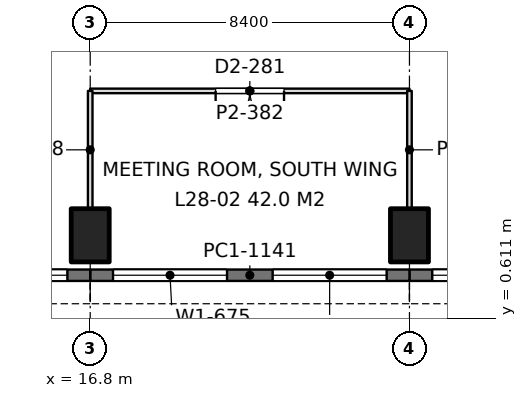
"""IFC4 building model, lengths in metres.
Left out: names, types, materials, properties, quantities, classifications, styles, units other than length and angle.
Written with IfcOpenShell. Run it as: python <this file> out.ifc"""

import sys

from ifc_helpers import new_model, si_unit, direction, frame, frame_2d, origin, origin_2d, place, context, subcontext, project, spatial, rectangle, extrude, element, fill, save


model = new_model("IFC4")
c1 = context("Model", 3, precision=1e-05, world=origin(), true_north=direction((0.0, 1.0)))
c2 = subcontext(c1, "Body", "Model", "MODEL_VIEW")
j1 = project(units=[si_unit("LENGTHUNIT", "METRE"), si_unit("PLANEANGLEUNIT", "RADIAN")], contexts=[c1])
p1 = place(None, origin())
s1 = spatial("IfcSite", under=j1, at=p1, CompositionType="ELEMENT")
p2 = place(p1, origin())
s2 = spatial("IfcBuilding", under=s1, at=p2, CompositionType="ELEMENT")
p3 = place(p2, frame((0.0, 0.0, 126.0)))
s3 = spatial("IfcBuildingStorey", under=s2, at=p3, CompositionType="ELEMENT", Elevation=126.0)
for number, where, z_axis, x_axis in (
    (1, (16.8, 2.8, 0.0), (0.0, 0.0, 1.0), (1.0, 0.0, 0.0)),
    (2, (25.2, 2.8, 0.0), (0.0, 0.0, 1.0), (1.0, 0.0, 0.0)),
):
    element("IfcColumn", number, at=place(p3, frame(where, z_axis=z_axis, x_axis=x_axis)), inside=s3, PredefinedType="COLUMN", context=c2, shape_type="SweptSolid", body=[
        extrude(rectangle(XDim=1.0, YDim=1.4, at=origin_2d()), origin(), (0.0, 0.0, 1.0), 4.2),
    ])
p4 = place(p3, frame((33.6, 1.75, 0.0), z_axis=(0.0, 0.0, 1.0), x_axis=(-1.0, 0.0, 0.0)))
e3 = element("IfcWall", 3, at=p4, inside=s3, PredefinedType="SOLIDWALL", context=c2, shape_type="SweptSolid", body=[
    extrude(rectangle(XDim=8.4, YDim=0.3, at=frame_2d((4.2, 0.0))), origin(), (0.0, 0.0, 1.0), 4.05),
])
p5 = place(p4, frame((0.6, 0.0, 0.9)))
e4 = element("IfcOpeningElement", 4, at=p5, cuts=e3, PredefinedType="OPENING", context=c2, shape_type="SweptSolid", body=[
    extrude(rectangle(XDim=3.0, YDim=1.9, at=frame_2d((1.5, 0.95))), frame((0.0, 0.16, 0.0), z_axis=(0.0, -1.0, 0.0), x_axis=(1.0, 0.0, 0.0)), (0.0, 0.0, 1.0), 0.32),
])
p6 = place(p4, frame((4.8, 0.0, 0.9)))
e5 = element("IfcOpeningElement", 5, at=p6, cuts=e3, PredefinedType="OPENING", context=c2, shape_type="SweptSolid", body=[
    extrude(rectangle(XDim=3.0, YDim=1.9, at=frame_2d((1.5, 0.95))), frame((0.0, 0.16, 0.0), z_axis=(0.0, -1.0, 0.0), x_axis=(1.0, 0.0, 0.0)), (0.0, 0.0, 1.0), 0.32),
])
p7 = place(p3, frame((25.2, 1.75, 0.0), z_axis=(0.0, 0.0, 1.0), x_axis=(-1.0, 0.0, 0.0)))
e6 = element("IfcWall", 6, at=p7, inside=s3, PredefinedType="SOLIDWALL", context=c2, shape_type="SweptSolid", body=[
    extrude(rectangle(XDim=8.4, YDim=0.3, at=frame_2d((4.2, 0.0))), origin(), (0.0, 0.0, 1.0), 4.05),
])
p8 = place(p7, frame((0.6, 0.0, 0.9)))
e7 = element("IfcOpeningElement", 7, at=p8, cuts=e6, PredefinedType="OPENING", context=c2, shape_type="SweptSolid", body=[
    extrude(rectangle(XDim=3.0, YDim=1.9, at=frame_2d((1.5, 0.95))), frame((0.0, 0.16, 0.0), z_axis=(0.0, -1.0, 0.0), x_axis=(1.0, 0.0, 0.0)), (0.0, 0.0, 1.0), 0.32),
])
p9 = place(p7, frame((4.8, 0.0, 0.9)))
e8 = element("IfcOpeningElement", 8, at=p9, cuts=e6, PredefinedType="OPENING", context=c2, shape_type="SweptSolid", body=[
    extrude(rectangle(XDim=3.0, YDim=1.9, at=frame_2d((1.5, 0.95))), frame((0.0, 0.16, 0.0), z_axis=(0.0, -1.0, 0.0), x_axis=(1.0, 0.0, 0.0)), (0.0, 0.0, 1.0), 0.32),
])
p10 = place(p3, frame((16.8, 1.75, 0.0), z_axis=(0.0, 0.0, 1.0), x_axis=(-1.0, 0.0, 0.0)))
e9 = element("IfcWall", 9, at=p10, inside=s3, PredefinedType="SOLIDWALL", context=c2, shape_type="SweptSolid", body=[
    extrude(rectangle(XDim=8.4, YDim=0.3, at=frame_2d((4.2, 0.0))), origin(), (0.0, 0.0, 1.0), 4.05),
])
p11 = place(p10, frame((0.6, 0.0, 0.9)))
e10 = element("IfcOpeningElement", 10, at=p11, cuts=e9, PredefinedType="OPENING", context=c2, shape_type="SweptSolid", body=[
    extrude(rectangle(XDim=3.0, YDim=1.9, at=frame_2d((1.5, 0.95))), frame((0.0, 0.16, 0.0), z_axis=(0.0, -1.0, 0.0), x_axis=(1.0, 0.0, 0.0)), (0.0, 0.0, 1.0), 0.32),
])
p12 = place(p10, frame((4.8, 0.0, 0.9)))
e11 = element("IfcOpeningElement", 11, at=p12, cuts=e9, PredefinedType="OPENING", context=c2, shape_type="SweptSolid", body=[
    extrude(rectangle(XDim=3.0, YDim=1.9, at=frame_2d((1.5, 0.95))), frame((0.0, 0.16, 0.0), z_axis=(0.0, -1.0, 0.0), x_axis=(1.0, 0.0, 0.0)), (0.0, 0.0, 1.0), 0.32),
])
p13 = place(p3, frame((16.8, 6.6, 0.0), z_axis=(0.0, 0.0, 1.0), x_axis=(1.0, 0.0, 0.0)))
e12 = element("IfcWall", 12, at=p13, inside=s3, PredefinedType="PARTITIONING", context=c2, shape_type="SweptSolid", body=[
    extrude(rectangle(XDim=8.4, YDim=0.12, at=frame_2d((4.2, 0.0))), origin(), (0.0, 0.0, 1.0), 3.55),
])
p14 = place(p13, frame((3.3, 0.0, 0.0)))
e13 = element("IfcOpeningElement", 13, at=p14, cuts=e12, PredefinedType="OPENING", context=c2, shape_type="SweptSolid", body=[
    extrude(rectangle(XDim=1.8, YDim=2.2, at=frame_2d((0.9, 1.1))), frame((0.0, 0.07, 0.0), z_axis=(0.0, -1.0, 0.0), x_axis=(1.0, 0.0, 0.0)), (0.0, 0.0, 1.0), 0.14),
])
for number, where, z_axis, x_axis in (
    (14, (16.8, 3.499, 0.0), (0.0, 0.0, 1.0), (0.0, 1.0, 0.0)),
    (15, (25.2, 3.499, 0.0), (0.0, 0.0, 1.0), (0.0, 1.0, 0.0)),
):
    element("IfcWall", number, at=place(p3, frame(where, z_axis=z_axis, x_axis=x_axis)), inside=s3, PredefinedType="PARTITIONING", context=c2, shape_type="SweptSolid", body=[
        extrude(rectangle(XDim=3.101, YDim=0.12, at=frame_2d((1.551, 0.0))), origin(), (0.0, 0.0, 1.0), 3.55),
    ])
p15 = place(p6, origin())
e16 = element("IfcWindow", 16, at=p15, inside=s3, PartitioningType="SINGLE_PANEL", PredefinedType="WINDOW", context=c2, shape_type="SweptSolid", body=[
    extrude(rectangle(XDim=3.0, YDim=1.9, at=frame_2d((1.5, 0.95))), frame((0.0, 0.03, 0.0), z_axis=(0.0, -1.0, 0.0), x_axis=(1.0, 0.0, 0.0)), (0.0, 0.0, 1.0), 0.06),
])
fill(e5, e16)
p16 = place(p8, origin())
e17 = element("IfcWindow", 17, at=p16, inside=s3, PartitioningType="SINGLE_PANEL", PredefinedType="WINDOW", context=c2, shape_type="SweptSolid", body=[
    extrude(rectangle(XDim=3.0, YDim=1.9, at=frame_2d((1.5, 0.95))), frame((0.0, 0.03, 0.0), z_axis=(0.0, -1.0, 0.0), x_axis=(1.0, 0.0, 0.0)), (0.0, 0.0, 1.0), 0.06),
])
fill(e7, e17)
p17 = place(p9, origin())
e18 = element("IfcWindow", 18, at=p17, inside=s3, PartitioningType="SINGLE_PANEL", PredefinedType="WINDOW", context=c2, shape_type="SweptSolid", body=[
    extrude(rectangle(XDim=3.0, YDim=1.9, at=frame_2d((1.5, 0.95))), frame((0.0, 0.03, 0.0), z_axis=(0.0, -1.0, 0.0), x_axis=(1.0, 0.0, 0.0)), (0.0, 0.0, 1.0), 0.06),
])
fill(e8, e18)
p18 = place(p11, origin())
e19 = element("IfcWindow", 19, at=p18, inside=s3, PartitioningType="SINGLE_PANEL", PredefinedType="WINDOW", context=c2, shape_type="SweptSolid", body=[
    extrude(rectangle(XDim=3.0, YDim=1.9, at=frame_2d((1.5, 0.95))), frame((0.0, 0.03, 0.0), z_axis=(0.0, -1.0, 0.0), x_axis=(1.0, 0.0, 0.0)), (0.0, 0.0, 1.0), 0.06),
])
fill(e10, e19)
p19 = place(p14, frame((1.8, 0.0, 0.0), z_axis=(0.0, 0.0, 1.0), x_axis=(-1.0, 0.0, 0.0)))
e20 = element("IfcDoor", 20, at=p19, inside=s3, OperationType="DOUBLE_DOOR_SINGLE_SWING", PredefinedType="DOOR", context=c2, shape_type="SweptSolid", body=[
    extrude(rectangle(XDim=1.8, YDim=2.2, at=frame_2d((0.9, 1.1))), frame((0.0, 0.025, 0.0), z_axis=(0.0, -1.0, 0.0), x_axis=(1.0, 0.0, 0.0)), (0.0, 0.0, 1.0), 0.05),
])
fill(e13, e20)
save(model, sys.argv[1])
